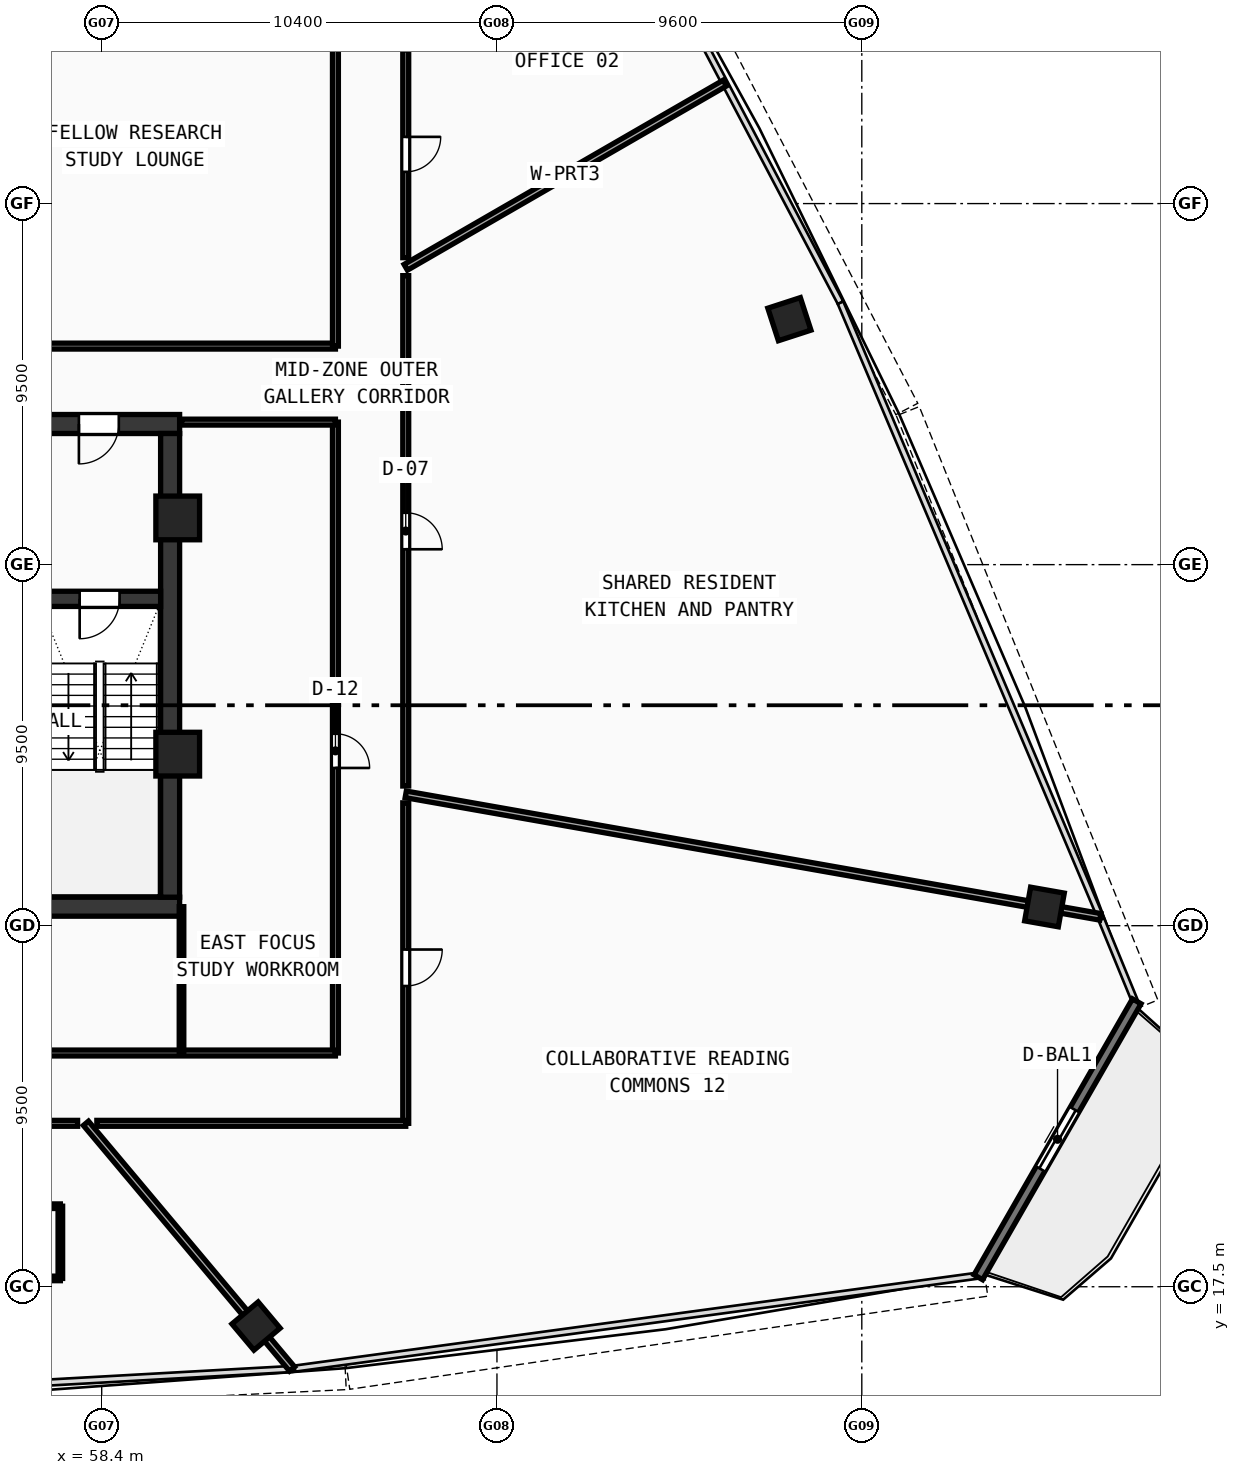
"""IFC4 building model, lengths in metres.
Left out: names, types, materials, properties, quantities, classifications, styles, units other than length and angle.
Written with IfcOpenShell. Run it as: python <this file> out.ifc"""

import sys

from ifc_helpers import new_model, si_unit, direction, frame, frame_2d, origin, origin_with_axes, origin_2d, place, context, subcontext, project, spatial, rectangle, hollow_rectangle, extrude, source, transform, mapped, element, fill, save


model = new_model("IFC4")
c1 = context("Model", 3, precision=1e-05, world=origin(), true_north=direction((0.0, 1.0)))
c2 = subcontext(c1, "Body", "Model", "MODEL_VIEW")
j1 = project(units=[si_unit("LENGTHUNIT", "METRE"), si_unit("PLANEANGLEUNIT", "RADIAN")], contexts=[c1])
p1 = place(None, origin())
s1 = spatial("IfcSite", under=j1, at=p1, CompositionType="ELEMENT")
p2 = place(p1, origin())
s2 = spatial("IfcBuilding", under=s1, at=p2, CompositionType="ELEMENT")
p3 = place(p2, frame((0.0, 0.0, 215.16)))
s3 = spatial("IfcBuildingStorey", under=s2, at=p3, CompositionType="ELEMENT", Elevation=215.16)
p4 = place(p3, frame((35.55, 27.5, 0.0), z_axis=(0.0, 0.0, 1.0), x_axis=(1.0, 0.0, 0.0)))
e1 = element("IfcWall", 1, at=p4, inside=s3, PredefinedType="SHEAR", context=c2, shape_type="SweptSolid", body=[
    extrude(rectangle(XDim=24.9, YDim=0.5, at=frame_2d((12.45, 0.0))), origin(), (0.0, 0.0, 1.0), 3.52),
])
p5 = place(p3, frame((49.2, 40.2, 0.0), z_axis=(0.0, 0.0, 1.0), x_axis=(1.0, 0.0, 0.0)))
e2 = element("IfcWall", 2, at=p5, inside=s3, PredefinedType="SHEAR", context=c2, shape_type="SweptSolid", body=[
    extrude(rectangle(XDim=11.25, YDim=0.5, at=frame_2d((5.625, 0.0))), origin(), (0.0, 0.0, 1.0), 3.52),
])
p6 = place(p5, frame((8.6, 0.0, 0.0)))
e3 = element("IfcOpeningElement", 3, at=p6, cuts=e2, PredefinedType="OPENING", context=c2, shape_type="SweptSolid", body=[
    extrude(rectangle(XDim=1.05, YDim=2.1, at=frame_2d((0.525, 1.05))), frame((0.0, 0.26, 0.0), z_axis=(0.0, -1.0, 0.0), x_axis=(1.0, 0.0, 0.0)), (0.0, 0.0, 1.0), 0.52),
])
p7 = place(p3, frame((60.2, 27.75, 0.0), z_axis=(0.0, 0.0, 1.0), x_axis=(0.0, 1.0, 0.0)))
e4 = element("IfcWall", 4, at=p7, inside=s3, PredefinedType="SHEAR", context=c2, shape_type="SweptSolid", body=[
    extrude(rectangle(XDim=12.2, YDim=0.5, at=frame_2d((6.1, 0.0))), origin(), (0.0, 0.0, 1.0), 3.52),
])
p8 = place(p3, frame((56.8, 35.6, 0.0), z_axis=(0.0, 0.0, 1.0), x_axis=(1.0, 0.0, 0.0)))
e5 = element("IfcWall", 5, at=p8, inside=s3, PredefinedType="SHEAR", context=c2, shape_type="SweptSolid", body=[
    extrude(rectangle(XDim=3.15, YDim=0.4, at=frame_2d((1.575, 0.0))), origin(), (0.0, 0.0, 1.0), 3.52),
])
p9 = place(p8, frame((1.02, 0.0, 0.0)))
e6 = element("IfcOpeningElement", 6, at=p9, cuts=e5, PredefinedType="OPENING", context=c2, shape_type="SweptSolid", body=[
    extrude(rectangle(XDim=1.05, YDim=2.1, at=frame_2d((0.525, 1.05))), frame((0.0, 0.21, 0.0), z_axis=(0.0, -1.0, 0.0), x_axis=(1.0, 0.0, 0.0)), (0.0, 0.0, 1.0), 0.42),
])
m1 = source(origin(), c2, "Body", "SweptSolid", [
    extrude(hollow_rectangle(XDim=1.15, YDim=1.15, WallThickness=0.048, at=origin_2d()), origin(), (0.0, 0.0, 1.0), 3.78),
])
for number, where, z_axis, x_axis in (
    (7, (60.4, 31.513, -0.26), (0.0, 0.0, 1.0), (1.0, 0.0, 0.0)),
    (8, (60.4, 37.729, -0.26), (0.0, 0.0, 1.0), (1.0, 0.0, 0.0)),
):
    element("IfcColumn", number, at=place(p3, frame(where, z_axis=z_axis, x_axis=x_axis)), inside=s3, PredefinedType="COLUMN", context=c2, shape_type="MappedRepresentation", body=[
        mapped(m1, transform((0.0, 0.0, 0.0), scale=1.0)),
    ])
m2 = source(origin(), c2, "Body", "SweptSolid", [
    extrude(hollow_rectangle(XDim=0.9, YDim=0.9, WallThickness=0.036, at=origin_2d()), origin(), (0.0, 0.0, 1.0), 3.78),
])
for number, where, z_axis, x_axis in (
    (9, (62.461, 16.466, -0.26), (0.0, 0.0, 1.0), (0.766, 0.643, 0.0)),
    (10, (83.207, 27.492, -0.26), (0.0, 0.0, 1.0), (0.174, 0.985, 0.0)),
    (11, (76.495, 42.958, -0.26), (0.0, 0.0, 1.0), (-0.309, 0.951, 0.0)),
):
    element("IfcColumn", number, at=place(p3, frame(where, z_axis=z_axis, x_axis=x_axis)), inside=s3, PredefinedType="COLUMN", context=c2, shape_type="MappedRepresentation", body=[
        mapped(m2, transform((0.0, 0.0, 0.0), scale=1.0)),
    ])
p10 = place(p3, frame((81.466, 17.75, 0.0), z_axis=(0.0, 0.0, 1.0), x_axis=(0.497934125263, 0.867214856249, 0.0)))
e12 = element("IfcWall", 12, at=p10, inside=s3, PredefinedType="STANDARD", context=c2, shape_type="SweptSolid", body=[
    extrude(rectangle(XDim=8.373, YDim=0.26, at=frame_2d((4.186, 0.0))), origin(), (0.0, 0.0, 1.0), 3.52),
])
p11 = place(p10, frame((3.286, 0.0, 0.0)))
e13 = element("IfcOpeningElement", 13, at=p11, cuts=e12, PredefinedType="OPENING", context=c2, shape_type="SweptSolid", body=[
    extrude(rectangle(XDim=1.8, YDim=2.15, at=frame_2d((0.9, 1.075))), frame((0.0, 0.14, 0.0), z_axis=(0.0, -1.0, 0.0), x_axis=(1.0, 0.0, 0.0)), (0.0, 0.0, 1.0), 0.28),
])
p12 = place(p3, frame((31.45, 42.25, 0.0), z_axis=(0.0, 0.0, 1.0), x_axis=(1.0, 0.0, 0.0)))
e14 = element("IfcWall", 14, at=p12, inside=s3, PredefinedType="PARTITIONING", context=c2, shape_type="SweptSolid", body=[
    extrude(rectangle(XDim=33.1, YDim=0.155, at=frame_2d((16.55, 0.0))), origin(), (0.0, 0.0, 1.0), 2.87),
])
p13 = place(p3, frame((64.55, 42.25, 0.0), z_axis=(0.0, 0.0, 1.0), x_axis=(0.0, 1.0, 0.0)))
e15 = element("IfcWall", 15, at=p13, inside=s3, PredefinedType="PARTITIONING", context=c2, shape_type="SweptSolid", body=[
    extrude(rectangle(XDim=11.7, YDim=0.155, at=frame_2d((5.85, 0.0))), origin(), (0.0, 0.0, 1.0), 2.87),
])
p14 = place(p3, frame((64.55, 23.65, 0.0), z_axis=(0.0, 0.0, 1.0), x_axis=(0.0, 1.0, 0.0)))
e16 = element("IfcWall", 16, at=p14, inside=s3, PredefinedType="PARTITIONING", context=c2, shape_type="SweptSolid", body=[
    extrude(rectangle(XDim=16.6, YDim=0.155, at=frame_2d((8.3, 0.0))), origin(), (0.0, 0.0, 1.0), 2.87),
])
p15 = place(p14, frame((7.5, 0.0, 0.0)))
e17 = element("IfcOpeningElement", 17, at=p15, cuts=e16, PredefinedType="OPENING", context=c2, shape_type="SweptSolid", body=[
    extrude(rectangle(XDim=0.9, YDim=2.08, at=frame_2d((0.45, 1.04))), frame((0.0, 0.087, 0.0), z_axis=(0.0, -1.0, 0.0), x_axis=(1.0, 0.0, 0.0)), (0.0, 0.0, 1.0), 0.175),
])
p16 = place(p3, frame((31.45, 23.65, 0.0), z_axis=(0.0, 0.0, 1.0), x_axis=(1.0, 0.0, 0.0)))
e18 = element("IfcWall", 18, at=p16, inside=s3, PredefinedType="PARTITIONING", context=c2, shape_type="SweptSolid", body=[
    extrude(rectangle(XDim=33.1, YDim=0.155, at=frame_2d((16.55, 0.0))), origin(), (0.0, 0.0, 1.0), 2.87),
])
p17 = place(p16, frame((16.0, 0.0, 0.0)))
e19 = element("IfcOpeningElement", 19, at=p17, cuts=e18, PredefinedType="OPENING", context=c2, shape_type="SweptSolid", body=[
    extrude(rectangle(XDim=0.92, YDim=2.1, at=frame_2d((0.46, 1.05))), frame((0.0, 0.087, 0.0), z_axis=(0.0, -1.0, 0.0), x_axis=(1.0, 0.0, 0.0)), (0.0, 0.0, 1.0), 0.175),
])
p18 = place(p3, frame((60.5, 40.25, 0.0), z_axis=(0.0, 0.0, 1.0), x_axis=(1.0, 0.0, 0.0)))
e20 = element("IfcWall", 20, at=p18, inside=s3, PredefinedType="PARTITIONING", context=c2, shape_type="SweptSolid", body=[
    extrude(rectangle(XDim=4.05, YDim=0.155, at=frame_2d((2.025, 0.0))), origin(), (0.0, 0.0, 1.0), 3.52),
])
p19 = place(p3, frame((60.5, 23.65, 0.0), z_axis=(0.0, 0.0, 1.0), x_axis=(0.0, 1.0, 0.0)))
e21 = element("IfcWall", 21, at=p19, inside=s3, PredefinedType="PARTITIONING", context=c2, shape_type="SweptSolid", body=[
    extrude(rectangle(XDim=3.85, YDim=0.12, at=frame_2d((1.925, 0.0))), origin(), (0.0, 0.0, 1.0), 3.12),
])
p20 = place(p3, frame((66.4, 44.323, 0.0), z_axis=(0.0, 0.0, 1.0), x_axis=(0.866029151995, 0.499993507853, 0.0)))
e22 = element("IfcWall", 22, at=p20, inside=s3, PredefinedType="PARTITIONING", context=c2, shape_type="SweptSolid", body=[
    extrude(rectangle(XDim=9.694, YDim=0.175, at=frame_2d((4.847, 0.0))), origin(), (0.0, 0.0, 1.0), 2.87),
])
p21 = place(p3, frame((57.985, 21.8, 0.0), z_axis=(0.0, 0.0, 1.0), x_axis=(0.642770599155, -0.766058716328, 0.0)))
e23 = element("IfcWall", 23, at=p21, inside=s3, PredefinedType="PARTITIONING", context=c2, shape_type="SweptSolid", body=[
    extrude(rectangle(XDim=8.438, YDim=0.175, at=frame_2d((4.219, 0.0))), origin(), (0.0, 0.0, 1.0), 2.87),
])
p22 = place(p3, frame((66.4, 30.456, 0.0), z_axis=(0.0, 0.0, 1.0), x_axis=(0.984808051039, -0.173646487465, 0.0)))
e24 = element("IfcWall", 24, at=p22, inside=s3, PredefinedType="PARTITIONING", context=c2, shape_type="SweptSolid", body=[
    extrude(rectangle(XDim=18.557, YDim=0.175, at=frame_2d((9.279, 0.0))), origin(), (0.0, 0.0, 1.0), 2.87),
])
p23 = place(p3, frame((66.4, 50.048, 0.0), z_axis=(0.0, 0.0, 1.0), x_axis=(0.0, -1.0, 0.0)))
e25 = element("IfcWall", 25, at=p23, inside=s3, PredefinedType="PARTITIONING", context=c2, shape_type="SweptSolid", body=[
    extrude(rectangle(XDim=5.47, YDim=0.155, at=frame_2d((2.735, 0.0))), origin(), (0.0, 0.0, 1.0), 2.87),
])
p24 = place(p23, frame((2.292, 0.0, 0.0)))
e26 = element("IfcOpeningElement", 26, at=p24, cuts=e25, PredefinedType="OPENING", context=c2, shape_type="SweptSolid", body=[
    extrude(rectangle(XDim=0.92, YDim=2.1, at=frame_2d((0.46, 1.05))), frame((0.0, 0.087, 0.0), z_axis=(0.0, -1.0, 0.0), x_axis=(1.0, 0.0, 0.0)), (0.0, 0.0, 1.0), 0.175),
])
p25 = place(p3, frame((66.4, 44.104, 0.0), z_axis=(0.0, 0.0, 1.0), x_axis=(0.0, -1.0, 0.0)))
e27 = element("IfcWall", 27, at=p25, inside=s3, PredefinedType="PARTITIONING", context=c2, shape_type="SweptSolid", body=[
    extrude(rectangle(XDim=13.428, YDim=0.155, at=frame_2d((6.714, 0.0))), origin(), (0.0, 0.0, 1.0), 2.87),
])
p26 = place(p25, frame((6.239, 0.0, 0.0)))
e28 = element("IfcOpeningElement", 28, at=p26, cuts=e27, PredefinedType="OPENING", context=c2, shape_type="SweptSolid", body=[
    extrude(rectangle(XDim=0.96, YDim=2.12, at=frame_2d((0.48, 1.06))), frame((0.0, 0.087, 0.0), z_axis=(0.0, -1.0, 0.0), x_axis=(1.0, 0.0, 0.0)), (0.0, 0.0, 1.0), 0.175),
])
p27 = place(p3, frame((66.4, 30.232, 0.0), z_axis=(0.0, 0.0, 1.0), x_axis=(0.0, -1.0, 0.0)))
e29 = element("IfcWall", 29, at=p27, inside=s3, PredefinedType="PARTITIONING", context=c2, shape_type="SweptSolid", body=[
    extrude(rectangle(XDim=8.432, YDim=0.155, at=frame_2d((4.216, 0.0))), origin(), (0.0, 0.0, 1.0), 3.12),
])
p28 = place(p27, frame((3.859, 0.0, 0.0)))
e30 = element("IfcOpeningElement", 30, at=p28, cuts=e29, PredefinedType="OPENING", context=c2, shape_type="SweptSolid", body=[
    extrude(rectangle(XDim=0.96, YDim=2.12, at=frame_2d((0.48, 1.06))), frame((0.0, 0.087, 0.0), z_axis=(0.0, -1.0, 0.0), x_axis=(1.0, 0.0, 0.0)), (0.0, 0.0, 1.0), 0.175),
])
p29 = place(p3, frame((66.4, 21.8, 0.0), z_axis=(0.0, 0.0, 1.0), x_axis=(-1.0, 0.0, 0.0)))
e31 = element("IfcWall", 31, at=p29, inside=s3, PredefinedType="PARTITIONING", context=c2, shape_type="SweptSolid", body=[
    extrude(rectangle(XDim=8.127, YDim=0.155, at=frame_2d((4.064, 0.0))), origin(), (0.0, 0.0, 1.0), 3.12),
])
p30 = place(p3, frame((57.765, 21.8, 0.0), z_axis=(0.0, 0.0, 1.0), x_axis=(-1.0, 0.0, 0.0)))
e32 = element("IfcWall", 32, at=p30, inside=s3, PredefinedType="PARTITIONING", context=c2, shape_type="SweptSolid", body=[
    extrude(rectangle(XDim=6.349, YDim=0.155, at=frame_2d((3.174, 0.0))), origin(), (0.0, 0.0, 1.0), 2.87),
])
p31 = place(p30, frame((2.703, 0.0, 0.0)))
e33 = element("IfcOpeningElement", 33, at=p31, cuts=e32, PredefinedType="OPENING", context=c2, shape_type="SweptSolid", body=[
    extrude(rectangle(XDim=0.96, YDim=2.12, at=frame_2d((0.48, 1.06))), frame((0.0, 0.087, 0.0), z_axis=(0.0, -1.0, 0.0), x_axis=(1.0, 0.0, 0.0)), (0.0, 0.0, 1.0), 0.175),
])
p32 = place(p3, frame((55.262, 17.719, 0.0), z_axis=(0.0, 0.0, 1.0), x_axis=(1.0, 0.0, 0.0)))
e34 = element("IfcWall", 34, at=p32, inside=s3, PredefinedType="PARTITIONING", context=c2, shape_type="SweptSolid", body=[
    extrude(rectangle(XDim=2.05, YDim=0.12, at=frame_2d((1.025, 0.0))), origin(), (0.0, 0.0, 1.0), 3.52),
])
p33 = place(p32, frame((0.6, 0.0, 0.0)))
e35 = element("IfcOpeningElement", 35, at=p33, cuts=e34, PredefinedType="OPENING", context=c2, shape_type="SweptSolid", body=[
    extrude(rectangle(XDim=0.85, YDim=2.1, at=frame_2d((0.425, 1.05))), frame((0.0, 0.07, 0.0), z_axis=(0.0, -1.0, 0.0), x_axis=(1.0, 0.0, 0.0)), (0.0, 0.0, 1.0), 0.14),
])
p34 = place(p3, frame((57.312, 17.719, 0.0), z_axis=(0.0, 0.0, 1.0), x_axis=(0.0, 1.0, 0.0)))
e36 = element("IfcWall", 36, at=p34, inside=s3, PredefinedType="PARTITIONING", context=c2, shape_type="SweptSolid", body=[
    extrude(rectangle(XDim=1.9, YDim=0.12, at=frame_2d((0.95, 0.0))), origin(), (0.0, 0.0, 1.0), 3.52),
])
p35 = place(p3, frame((57.312, 19.619, 0.0), z_axis=(0.0, 0.0, 1.0), x_axis=(-1.0, 0.0, 0.0)))
e37 = element("IfcWall", 37, at=p35, inside=s3, PredefinedType="PARTITIONING", context=c2, shape_type="SweptSolid", body=[
    extrude(rectangle(XDim=2.05, YDim=0.12, at=frame_2d((1.025, 0.0))), origin(), (0.0, 0.0, 1.0), 3.52),
])
m3 = source(origin(), c2, "Body", "SweptSolid", [
    extrude(rectangle(XDim=1.8, YDim=2.15, at=frame_2d((0.9, 1.075))), frame((0.0, 0.025, 0.0), z_axis=(0.0, -1.0, 0.0), x_axis=(1.0, 0.0, 0.0)), (0.0, 0.0, 1.0), 0.05),
])
p36 = place(p11, origin_with_axes())
e38 = element("IfcDoor", 38, at=p36, inside=s3, OperationType="DOUBLE_DOOR_SLIDING", PredefinedType="DOOR", context=c2, shape_type="MappedRepresentation", body=[
    mapped(m3, transform((0.0, 0.0, 0.0), scale=1.0)),
])
fill(e13, e38)
m4 = source(origin(), c2, "Body", "SweptSolid", [
    extrude(rectangle(XDim=1.05, YDim=2.1, at=frame_2d((0.525, 1.05))), frame((0.0, 0.025, 0.0), z_axis=(0.0, -1.0, 0.0), x_axis=(1.0, 0.0, 0.0)), (0.0, 0.0, 1.0), 0.05),
])
p37 = place(p9, frame((1.05, 0.0, 0.0), z_axis=(0.0, 0.0, 1.0), x_axis=(-1.0, 0.0, 0.0)))
e39 = element("IfcDoor", 39, at=p37, inside=s3, OperationType="SINGLE_SWING_RIGHT", PredefinedType="DOOR", context=c2, shape_type="MappedRepresentation", body=[
    mapped(m4, transform((0.0, 0.0, 0.0), scale=1.0)),
])
fill(e6, e39)
p38 = place(p6, frame((1.05, 0.0, 0.0), z_axis=(0.0, 0.0, 1.0), x_axis=(-1.0, 0.0, 0.0)))
e40 = element("IfcDoor", 40, at=p38, inside=s3, OperationType="SINGLE_SWING_RIGHT", PredefinedType="DOOR", context=c2, shape_type="MappedRepresentation", body=[
    mapped(m4, transform((0.0, 0.0, 0.0), scale=1.0)),
])
fill(e3, e40)
m5 = source(origin(), c2, "Body", "SweptSolid", [
    extrude(rectangle(XDim=0.9, YDim=2.08, at=frame_2d((0.45, 1.04))), frame((0.0, 0.025, 0.0), z_axis=(0.0, -1.0, 0.0), x_axis=(1.0, 0.0, 0.0)), (0.0, 0.0, 1.0), 0.05),
])
p39 = place(p15, frame((0.9, 0.0, 0.0), z_axis=(0.0, 0.0, 1.0), x_axis=(-1.0, 0.0, 0.0)))
e41 = element("IfcDoor", 41, at=p39, inside=s3, OperationType="SINGLE_SWING_RIGHT", PredefinedType="DOOR", context=c2, shape_type="MappedRepresentation", body=[
    mapped(m5, transform((0.0, 0.0, 0.0), scale=1.0)),
])
fill(e17, e41)
m6 = source(origin(), c2, "Body", "SweptSolid", [
    extrude(rectangle(XDim=0.96, YDim=2.12, at=frame_2d((0.48, 1.06))), frame((0.0, 0.025, 0.0), z_axis=(0.0, -1.0, 0.0), x_axis=(1.0, 0.0, 0.0)), (0.0, 0.0, 1.0), 0.05),
])
p40 = place(p26, origin_with_axes())
e42 = element("IfcDoor", 42, at=p40, inside=s3, OperationType="SINGLE_SWING_RIGHT", PredefinedType="DOOR", context=c2, shape_type="MappedRepresentation", body=[
    mapped(m6, transform((0.0, 0.0, 0.0), scale=1.0)),
])
fill(e28, e42)
m7 = source(origin(), c2, "Body", "SweptSolid", [
    extrude(rectangle(XDim=0.92, YDim=2.1, at=frame_2d((0.46, 1.05))), frame((0.0, 0.025, 0.0), z_axis=(0.0, -1.0, 0.0), x_axis=(1.0, 0.0, 0.0)), (0.0, 0.0, 1.0), 0.05),
])
p41 = place(p24, origin_with_axes())
e43 = element("IfcDoor", 43, at=p41, inside=s3, OperationType="SINGLE_SWING_LEFT", PredefinedType="DOOR", context=c2, shape_type="MappedRepresentation", body=[
    mapped(m7, transform((0.0, 0.0, 0.0), scale=1.0)),
])
fill(e26, e43)
p42 = place(p28, origin_with_axes())
e44 = element("IfcDoor", 44, at=p42, inside=s3, OperationType="SINGLE_SWING_LEFT", PredefinedType="DOOR", context=c2, shape_type="MappedRepresentation", body=[
    mapped(m6, transform((0.0, 0.0, 0.0), scale=1.0)),
])
fill(e30, e44)
save(model, sys.argv[1])
